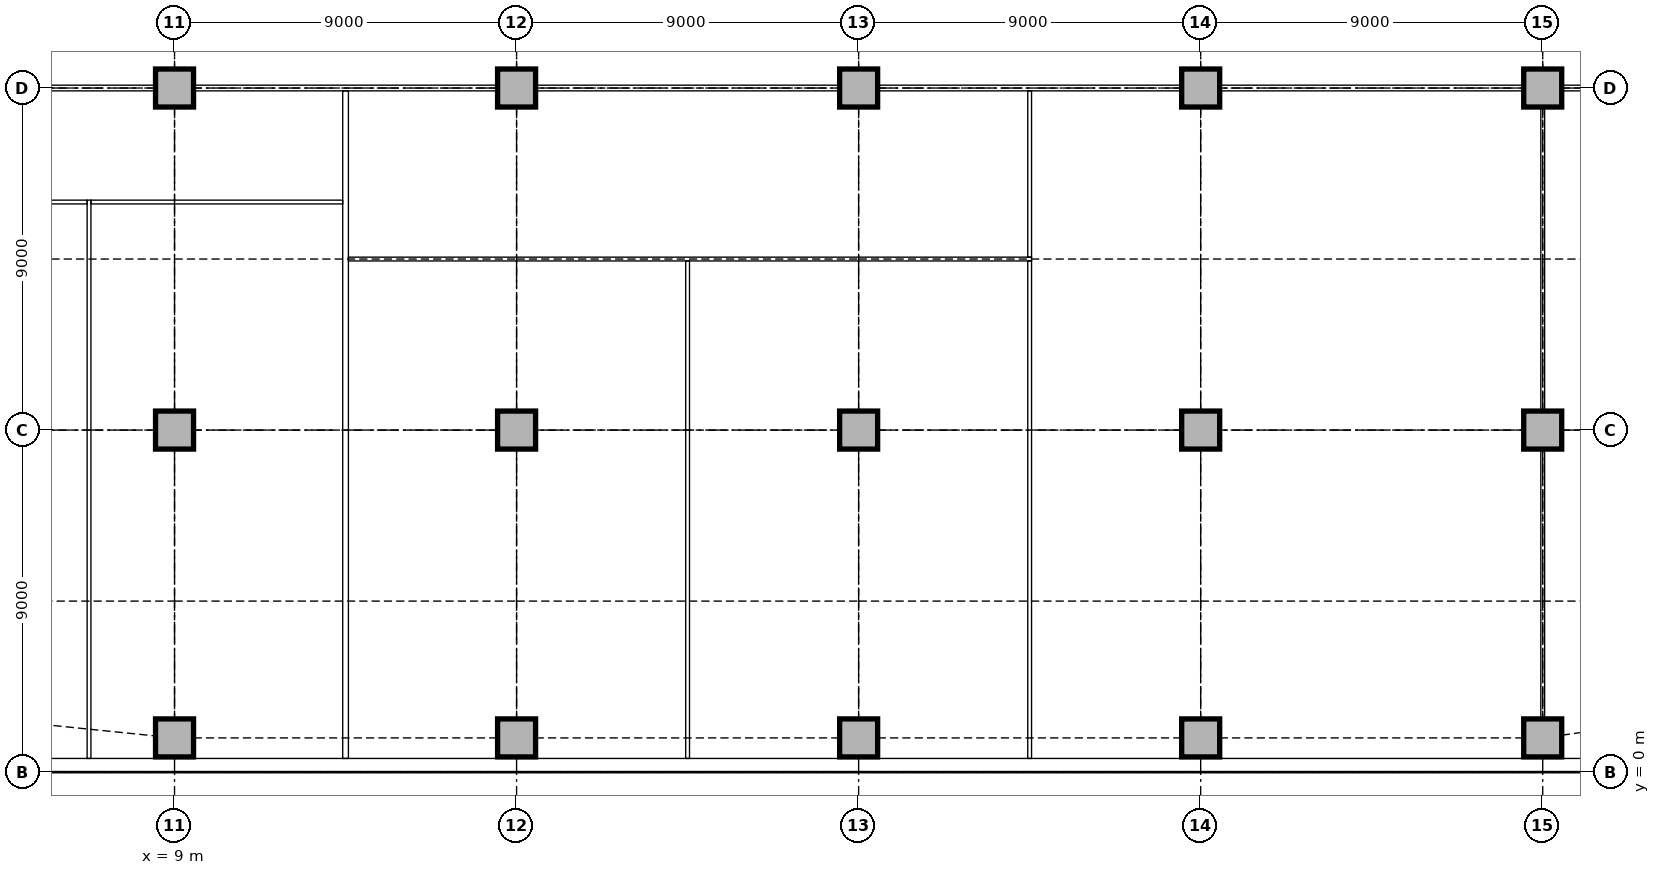
"""IFC4 building model, lengths in metres.
Left out: names, types, materials, properties, quantities, classifications, styles, units other than length and angle.
Written with IfcOpenShell. Run it as: python <this file> out.ifc"""

import sys

from ifc_helpers import new_model, si_unit, direction, frame, frame_2d, origin, origin_2d, place, context, subcontext, project, spatial, rectangle, extrude, element, fill, save


model = new_model("IFC4")
c1 = context("Model", 3, precision=1e-05, world=origin(), true_north=direction((0.0, 1.0)))
c2 = subcontext(c1, "Body", "Model", "MODEL_VIEW")
j1 = project(units=[si_unit("LENGTHUNIT", "METRE"), si_unit("PLANEANGLEUNIT", "RADIAN")], contexts=[c1])
p1 = place(None, origin())
s1 = spatial("IfcSite", under=j1, at=p1, CompositionType="ELEMENT")
p2 = place(p1, origin())
s2 = spatial("IfcBuilding", under=s1, at=p2, CompositionType="ELEMENT")
p3 = place(p2, frame((0.0, 0.0, 26.0)))
s3 = spatial("IfcBuildingStorey", under=s2, at=p3, CompositionType="ELEMENT", Elevation=26.0)
for number, where, z_axis, x_axis in (
    (1, (9.0, 0.9, 0.0), (0.0, 0.0, 1.0), (1.0, 0.0, 0.0)),
    (2, (18.0, 0.9, 0.0), (0.0, 0.0, 1.0), (1.0, 0.0, 0.0)),
    (3, (27.0, 0.9, 0.0), (0.0, 0.0, 1.0), (1.0, 0.0, 0.0)),
    (4, (36.0, 0.9, 0.0), (0.0, 0.0, 1.0), (1.0, 0.0, 0.0)),
    (5, (45.0, 0.9, 0.0), (0.0, 0.0, 1.0), (1.0, 0.0, 0.0)),
    (6, (9.0, 9.0, 0.0), (0.0, 0.0, 1.0), (1.0, 0.0, 0.0)),
    (7, (9.0, 18.0, 0.0), (0.0, 0.0, 1.0), (1.0, 0.0, 0.0)),
    (8, (18.0, 9.0, 0.0), (0.0, 0.0, 1.0), (1.0, 0.0, 0.0)),
    (9, (18.0, 18.0, 0.0), (0.0, 0.0, 1.0), (1.0, 0.0, 0.0)),
    (10, (27.0, 9.0, 0.0), (0.0, 0.0, 1.0), (1.0, 0.0, 0.0)),
    (11, (27.0, 18.0, 0.0), (0.0, 0.0, 1.0), (1.0, 0.0, 0.0)),
    (12, (36.0, 9.0, 0.0), (0.0, 0.0, 1.0), (1.0, 0.0, 0.0)),
    (13, (36.0, 18.0, 0.0), (0.0, 0.0, 1.0), (1.0, 0.0, 0.0)),
    (14, (45.0, 9.0, 0.0), (0.0, 0.0, 1.0), (1.0, 0.0, 0.0)),
    (15, (45.0, 18.0, 0.0), (0.0, 0.0, 1.0), (1.0, 0.0, 0.0)),
):
    element("IfcColumn", number, at=place(p3, frame(where, z_axis=z_axis, x_axis=x_axis)), inside=s3, PredefinedType="COLUMN", context=c2, shape_type="SweptSolid", body=[
        extrude(rectangle(XDim=1.0, YDim=1.0, at=origin_2d()), origin(), (0.0, 0.0, 1.0), 3.85),
    ])
p4 = place(p3, frame((4.243, 0.18, 0.0), z_axis=(0.0, 0.0, 1.0), x_axis=(1.0, 0.0, 0.0)))
e16 = element("IfcWall", 16, at=p4, inside=s3, PredefinedType="STANDARD", context=c2, shape_type="SweptSolid", body=[
    extrude(rectangle(XDim=44.015, YDim=0.36, at=frame_2d((22.007, 0.0))), origin(), (0.0, 0.0, 1.0), 3.85),
])
p5 = place(p4, frame((2.707, 0.0, 0.9)))
e17 = element("IfcOpeningElement", 17, at=p5, cuts=e16, PredefinedType="OPENING", context=c2, shape_type="SweptSolid", body=[
    extrude(rectangle(XDim=3.3, YDim=1.6, at=frame_2d((1.65, 0.8))), frame((0.0, 0.19, 0.0), z_axis=(0.0, -1.0, 0.0), x_axis=(1.0, 0.0, 0.0)), (0.0, 0.0, 1.0), 0.38),
])
p6 = place(p4, frame((7.157, 0.0, 0.0)))
e18 = element("IfcOpeningElement", 18, at=p6, cuts=e16, PredefinedType="OPENING", context=c2, shape_type="SweptSolid", body=[
    extrude(rectangle(XDim=1.8, YDim=2.4, at=frame_2d((0.9, 1.2))), frame((0.0, 0.19, 0.0), z_axis=(0.0, -1.0, 0.0), x_axis=(1.0, 0.0, 0.0)), (0.0, 0.0, 1.0), 0.38),
])
p7 = place(p4, frame((11.357, 0.0, 0.9)))
e19 = element("IfcOpeningElement", 19, at=p7, cuts=e16, PredefinedType="OPENING", context=c2, shape_type="SweptSolid", body=[
    extrude(rectangle(XDim=3.3, YDim=1.6, at=frame_2d((1.65, 0.8))), frame((0.0, 0.19, 0.0), z_axis=(0.0, -1.0, 0.0), x_axis=(1.0, 0.0, 0.0)), (0.0, 0.0, 1.0), 0.38),
])
p8 = place(p4, frame((16.307, 0.0, 0.9)))
e20 = element("IfcOpeningElement", 20, at=p8, cuts=e16, PredefinedType="OPENING", context=c2, shape_type="SweptSolid", body=[
    extrude(rectangle(XDim=1.8, YDim=1.6, at=frame_2d((0.9, 0.8))), frame((0.0, 0.19, 0.0), z_axis=(0.0, -1.0, 0.0), x_axis=(1.0, 0.0, 0.0)), (0.0, 0.0, 1.0), 0.38),
])
p9 = place(p4, frame((20.357, 0.0, 0.9)))
e21 = element("IfcOpeningElement", 21, at=p9, cuts=e16, PredefinedType="OPENING", context=c2, shape_type="SweptSolid", body=[
    extrude(rectangle(XDim=3.3, YDim=1.6, at=frame_2d((1.65, 0.8))), frame((0.0, 0.19, 0.0), z_axis=(0.0, -1.0, 0.0), x_axis=(1.0, 0.0, 0.0)), (0.0, 0.0, 1.0), 0.38),
])
p10 = place(p4, frame((25.307, 0.0, 0.9)))
e22 = element("IfcOpeningElement", 22, at=p10, cuts=e16, PredefinedType="OPENING", context=c2, shape_type="SweptSolid", body=[
    extrude(rectangle(XDim=1.8, YDim=1.6, at=frame_2d((0.9, 0.8))), frame((0.0, 0.19, 0.0), z_axis=(0.0, -1.0, 0.0), x_axis=(1.0, 0.0, 0.0)), (0.0, 0.0, 1.0), 0.38),
])
p11 = place(p4, frame((29.357, 0.0, 0.9)))
e23 = element("IfcOpeningElement", 23, at=p11, cuts=e16, PredefinedType="OPENING", context=c2, shape_type="SweptSolid", body=[
    extrude(rectangle(XDim=3.3, YDim=1.6, at=frame_2d((1.65, 0.8))), frame((0.0, 0.19, 0.0), z_axis=(0.0, -1.0, 0.0), x_axis=(1.0, 0.0, 0.0)), (0.0, 0.0, 1.0), 0.38),
])
p12 = place(p4, frame((33.857, 0.0, 0.9)))
e24 = element("IfcOpeningElement", 24, at=p12, cuts=e16, PredefinedType="OPENING", context=c2, shape_type="SweptSolid", body=[
    extrude(rectangle(XDim=3.3, YDim=1.6, at=frame_2d((1.65, 0.8))), frame((0.0, 0.19, 0.0), z_axis=(0.0, -1.0, 0.0), x_axis=(1.0, 0.0, 0.0)), (0.0, 0.0, 1.0), 0.38),
])
p13 = place(p4, frame((38.357, 0.0, 0.9)))
e25 = element("IfcOpeningElement", 25, at=p13, cuts=e16, PredefinedType="OPENING", context=c2, shape_type="SweptSolid", body=[
    extrude(rectangle(XDim=3.3, YDim=1.6, at=frame_2d((1.65, 0.8))), frame((0.0, 0.19, 0.0), z_axis=(0.0, -1.0, 0.0), x_axis=(1.0, 0.0, 0.0)), (0.0, 0.0, 1.0), 0.38),
])
p14 = place(p3, frame((45.5, 18.0, 0.0), z_axis=(0.0, 0.0, 1.0), x_axis=(1.0, 0.0, 0.0)))
e26 = element("IfcWall", 26, at=p14, inside=s3, PredefinedType="PARTITIONING", context=c2, shape_type="SweptSolid", body=[
    extrude(rectangle(XDim=8.0, YDim=0.15, at=frame_2d((4.0, 0.0))), origin(), (0.0, 0.0, 1.0), 3.15),
])
p15 = place(p3, frame((36.5, 18.0, 0.0), z_axis=(0.0, 0.0, 1.0), x_axis=(1.0, 0.0, 0.0)))
e27 = element("IfcWall", 27, at=p15, inside=s3, PredefinedType="PARTITIONING", context=c2, shape_type="SweptSolid", body=[
    extrude(rectangle(XDim=8.0, YDim=0.15, at=frame_2d((4.0, 0.0))), origin(), (0.0, 0.0, 1.0), 3.15),
])
p16 = place(p15, frame((3.55, 0.0, 0.0)))
e28 = element("IfcOpeningElement", 28, at=p16, cuts=e27, PredefinedType="OPENING", context=c2, shape_type="SweptSolid", body=[
    extrude(rectangle(XDim=0.9, YDim=2.1, at=frame_2d((0.45, 1.05))), frame((0.0, 0.085, 0.0), z_axis=(0.0, -1.0, 0.0), x_axis=(1.0, 0.0, 0.0)), (0.0, 0.0, 1.0), 0.17),
])
p17 = place(p3, frame((27.5, 18.0, 0.0), z_axis=(0.0, 0.0, 1.0), x_axis=(1.0, 0.0, 0.0)))
e29 = element("IfcWall", 29, at=p17, inside=s3, PredefinedType="PARTITIONING", context=c2, shape_type="SweptSolid", body=[
    extrude(rectangle(XDim=8.0, YDim=0.15, at=frame_2d((4.0, 0.0))), origin(), (0.0, 0.0, 1.0), 3.15),
])
p18 = place(p3, frame((18.5, 18.0, 0.0), z_axis=(0.0, 0.0, 1.0), x_axis=(1.0, 0.0, 0.0)))
e30 = element("IfcWall", 30, at=p18, inside=s3, PredefinedType="PARTITIONING", context=c2, shape_type="SweptSolid", body=[
    extrude(rectangle(XDim=8.0, YDim=0.15, at=frame_2d((4.0, 0.0))), origin(), (0.0, 0.0, 1.0), 3.15),
])
p19 = place(p18, frame((3.5, 0.0, 0.0)))
e31 = element("IfcOpeningElement", 31, at=p19, cuts=e30, PredefinedType="OPENING", context=c2, shape_type="SweptSolid", body=[
    extrude(rectangle(XDim=1.0, YDim=2.1, at=frame_2d((0.5, 1.05))), frame((0.0, 0.085, 0.0), z_axis=(0.0, -1.0, 0.0), x_axis=(1.0, 0.0, 0.0)), (0.0, 0.0, 1.0), 0.17),
])
p20 = place(p3, frame((9.5, 18.0, 0.0), z_axis=(0.0, 0.0, 1.0), x_axis=(1.0, 0.0, 0.0)))
e32 = element("IfcWall", 32, at=p20, inside=s3, PredefinedType="PARTITIONING", context=c2, shape_type="SweptSolid", body=[
    extrude(rectangle(XDim=8.0, YDim=0.15, at=frame_2d((4.0, 0.0))), origin(), (0.0, 0.0, 1.0), 3.15),
])
p21 = place(p3, frame((1.4, 18.0, 0.0), z_axis=(0.0, 0.0, 1.0), x_axis=(1.0, 0.0, 0.0)))
e33 = element("IfcWall", 33, at=p21, inside=s3, PredefinedType="PARTITIONING", context=c2, shape_type="SweptSolid", body=[
    extrude(rectangle(XDim=7.1, YDim=0.15, at=frame_2d((3.55, 0.0))), origin(), (0.0, 0.0, 1.0), 3.15),
])
p22 = place(p21, frame((3.05, 0.0, 0.0)))
e34 = element("IfcOpeningElement", 34, at=p22, cuts=e33, PredefinedType="OPENING", context=c2, shape_type="SweptSolid", body=[
    extrude(rectangle(XDim=1.0, YDim=2.1, at=frame_2d((0.5, 1.05))), frame((0.0, 0.085, 0.0), z_axis=(0.0, -1.0, 0.0), x_axis=(1.0, 0.0, 0.0)), (0.0, 0.0, 1.0), 0.17),
])
p23 = place(p3, frame((13.5, 0.36, 0.0), z_axis=(0.0, 0.0, 1.0), x_axis=(0.0, 1.0, 0.0)))
e35 = element("IfcWall", 35, at=p23, inside=s3, PredefinedType="PARTITIONING", context=c2, shape_type="SweptSolid", body=[
    extrude(rectangle(XDim=17.565, YDim=0.15, at=frame_2d((8.783, 0.0))), origin(), (0.0, 0.0, 1.0), 3.85),
])
p24 = place(p3, frame((13.575, 13.5, 0.0), z_axis=(0.0, 0.0, 1.0), x_axis=(1.0, 0.0, 0.0)))
e36 = element("IfcWall", 36, at=p24, inside=s3, PredefinedType="PARTITIONING", context=c2, shape_type="SweptSolid", body=[
    extrude(rectangle(XDim=17.975, YDim=0.1, at=frame_2d((8.988, 0.0))), origin(), (0.0, 0.0, 1.0), 3.35),
])
p25 = place(p24, frame((4.1, 0.0, 0.0)))
e37 = element("IfcOpeningElement", 37, at=p25, cuts=e36, PredefinedType="OPENING", context=c2, shape_type="SweptSolid", body=[
    extrude(rectangle(XDim=0.9, YDim=2.1, at=frame_2d((0.45, 1.05))), frame((0.0, 0.06, 0.0), z_axis=(0.0, -1.0, 0.0), x_axis=(1.0, 0.0, 0.0)), (0.0, 0.0, 1.0), 0.12),
])
p26 = place(p24, frame((12.925, 0.0, 0.0)))
e38 = element("IfcOpeningElement", 38, at=p26, cuts=e36, PredefinedType="OPENING", context=c2, shape_type="SweptSolid", body=[
    extrude(rectangle(XDim=0.9, YDim=2.1, at=frame_2d((0.45, 1.05))), frame((0.0, 0.06, 0.0), z_axis=(0.0, -1.0, 0.0), x_axis=(1.0, 0.0, 0.0)), (0.0, 0.0, 1.0), 0.12),
])
p27 = place(p3, frame((31.5, 13.55, 0.0), z_axis=(0.0, 0.0, 1.0), x_axis=(0.0, 1.0, 0.0)))
e39 = element("IfcWall", 39, at=p27, inside=s3, PredefinedType="PARTITIONING", context=c2, shape_type="SweptSolid", body=[
    extrude(rectangle(XDim=4.375, YDim=0.1, at=frame_2d((2.188, 0.0))), origin(), (0.0, 0.0, 1.0), 3.85),
])
p28 = place(p3, frame((31.5, 0.36, 0.0), z_axis=(0.0, 0.0, 1.0), x_axis=(0.0, 1.0, 0.0)))
e40 = element("IfcWall", 40, at=p28, inside=s3, PredefinedType="PARTITIONING", context=c2, shape_type="SweptSolid", body=[
    extrude(rectangle(XDim=13.09, YDim=0.1, at=frame_2d((6.545, 0.0))), origin(), (0.0, 0.0, 1.0), 3.85),
])
p29 = place(p3, frame((45.0, 1.4, 0.0), z_axis=(0.0, 0.0, 1.0), x_axis=(0.0, 1.0, 0.0)))
e41 = element("IfcWall", 41, at=p29, inside=s3, PredefinedType="PARTITIONING", context=c2, shape_type="SweptSolid", body=[
    extrude(rectangle(XDim=7.1, YDim=0.1, at=frame_2d((3.55, 0.0))), origin(), (0.0, 0.0, 1.0), 3.158),
])
p30 = place(p3, frame((45.0, 9.5, 0.0), z_axis=(0.0, 0.0, 1.0), x_axis=(0.0, 1.0, 0.0)))
e42 = element("IfcWall", 42, at=p30, inside=s3, PredefinedType="PARTITIONING", context=c2, shape_type="SweptSolid", body=[
    extrude(rectangle(XDim=8.0, YDim=0.1, at=frame_2d((4.0, 0.0))), origin(), (0.0, 0.0, 1.0), 3.158),
])
p31 = place(p3, frame((6.75, 0.36, 0.0), z_axis=(0.0, 0.0, 1.0), x_axis=(0.0, 1.0, 0.0)))
e43 = element("IfcWall", 43, at=p31, inside=s3, PredefinedType="PARTITIONING", context=c2, shape_type="SweptSolid", body=[
    extrude(rectangle(XDim=14.69, YDim=0.1, at=frame_2d((7.345, 0.0))), origin(), (0.0, 0.0, 1.0), 3.85),
])
p32 = place(p3, frame((6.8, 15.0, 0.0), z_axis=(0.0, 0.0, 1.0), x_axis=(1.0, 0.0, 0.0)))
e44 = element("IfcWall", 44, at=p32, inside=s3, PredefinedType="PARTITIONING", context=c2, shape_type="SweptSolid", body=[
    extrude(rectangle(XDim=6.625, YDim=0.1, at=frame_2d((3.312, 0.0))), origin(), (0.0, 0.0, 1.0), 3.85),
])
p33 = place(p32, frame((2.85, 0.0, 0.0)))
e45 = element("IfcOpeningElement", 45, at=p33, cuts=e44, PredefinedType="OPENING", context=c2, shape_type="SweptSolid", body=[
    extrude(rectangle(XDim=0.9, YDim=2.1, at=frame_2d((0.45, 1.05))), frame((0.0, 0.06, 0.0), z_axis=(0.0, -1.0, 0.0), x_axis=(1.0, 0.0, 0.0)), (0.0, 0.0, 1.0), 0.12),
])
p34 = place(p3, frame((0.36, 15.0, 0.0), z_axis=(0.0, 0.0, 1.0), x_axis=(1.0, 0.0, 0.0)))
e46 = element("IfcWall", 46, at=p34, inside=s3, PredefinedType="PARTITIONING", context=c2, shape_type="SweptSolid", body=[
    extrude(rectangle(XDim=6.34, YDim=0.1, at=frame_2d((3.17, 0.0))), origin(), (0.0, 0.0, 1.0), 3.85),
])
p35 = place(p34, frame((2.7, 0.0, 0.0)))
e47 = element("IfcOpeningElement", 47, at=p35, cuts=e46, PredefinedType="OPENING", context=c2, shape_type="SweptSolid", body=[
    extrude(rectangle(XDim=0.9, YDim=2.1, at=frame_2d((0.45, 1.05))), frame((0.0, 0.06, 0.0), z_axis=(0.0, -1.0, 0.0), x_axis=(1.0, 0.0, 0.0)), (0.0, 0.0, 1.0), 0.12),
])
p36 = place(p3, frame((22.5, 0.36, 0.0), z_axis=(0.0, 0.0, 1.0), x_axis=(0.0, 1.0, 0.0)))
e48 = element("IfcWall", 48, at=p36, inside=s3, PredefinedType="PARTITIONING", context=c2, shape_type="SweptSolid", body=[
    extrude(rectangle(XDim=13.09, YDim=0.1, at=frame_2d((6.545, 0.0))), origin(), (0.0, 0.0, 1.0), 3.85),
])
p37 = place(p5, origin())
e49 = element("IfcWindow", 49, at=p37, inside=s3, PartitioningType="SINGLE_PANEL", PredefinedType="WINDOW", context=c2, shape_type="SweptSolid", body=[
    extrude(rectangle(XDim=3.3, YDim=1.6, at=frame_2d((1.65, 0.8))), frame((0.0, 0.13, 0.0), z_axis=(0.0, -1.0, 0.0), x_axis=(1.0, 0.0, 0.0)), (0.0, 0.0, 1.0), 0.06),
])
fill(e17, e49)
p38 = place(p6, frame((1.8, 0.0, 0.0), z_axis=(0.0, 0.0, 1.0), x_axis=(-1.0, 0.0, 0.0)))
e50 = element("IfcDoor", 50, at=p38, inside=s3, OperationType="DOUBLE_DOOR_SINGLE_SWING", PredefinedType="DOOR", context=c2, shape_type="SweptSolid", body=[
    extrude(rectangle(XDim=1.8, YDim=2.4, at=frame_2d((0.9, 1.2))), frame((0.0, -0.07, 0.0), z_axis=(0.0, -1.0, 0.0), x_axis=(1.0, 0.0, 0.0)), (0.0, 0.0, 1.0), 0.05),
])
fill(e18, e50)
p39 = place(p7, origin())
e51 = element("IfcWindow", 51, at=p39, inside=s3, PartitioningType="SINGLE_PANEL", PredefinedType="WINDOW", context=c2, shape_type="SweptSolid", body=[
    extrude(rectangle(XDim=3.3, YDim=1.6, at=frame_2d((1.65, 0.8))), frame((0.0, 0.13, 0.0), z_axis=(0.0, -1.0, 0.0), x_axis=(1.0, 0.0, 0.0)), (0.0, 0.0, 1.0), 0.06),
])
fill(e19, e51)
p40 = place(p8, origin())
e52 = element("IfcWindow", 52, at=p40, inside=s3, PartitioningType="SINGLE_PANEL", PredefinedType="WINDOW", context=c2, shape_type="SweptSolid", body=[
    extrude(rectangle(XDim=1.8, YDim=1.6, at=frame_2d((0.9, 0.8))), frame((0.0, 0.13, 0.0), z_axis=(0.0, -1.0, 0.0), x_axis=(1.0, 0.0, 0.0)), (0.0, 0.0, 1.0), 0.06),
])
fill(e20, e52)
p41 = place(p9, origin())
e53 = element("IfcWindow", 53, at=p41, inside=s3, PartitioningType="SINGLE_PANEL", PredefinedType="WINDOW", context=c2, shape_type="SweptSolid", body=[
    extrude(rectangle(XDim=3.3, YDim=1.6, at=frame_2d((1.65, 0.8))), frame((0.0, 0.13, 0.0), z_axis=(0.0, -1.0, 0.0), x_axis=(1.0, 0.0, 0.0)), (0.0, 0.0, 1.0), 0.06),
])
fill(e21, e53)
p42 = place(p10, origin())
e54 = element("IfcWindow", 54, at=p42, inside=s3, PartitioningType="SINGLE_PANEL", PredefinedType="WINDOW", context=c2, shape_type="SweptSolid", body=[
    extrude(rectangle(XDim=1.8, YDim=1.6, at=frame_2d((0.9, 0.8))), frame((0.0, 0.13, 0.0), z_axis=(0.0, -1.0, 0.0), x_axis=(1.0, 0.0, 0.0)), (0.0, 0.0, 1.0), 0.06),
])
fill(e22, e54)
p43 = place(p11, origin())
e55 = element("IfcWindow", 55, at=p43, inside=s3, PartitioningType="SINGLE_PANEL", PredefinedType="WINDOW", context=c2, shape_type="SweptSolid", body=[
    extrude(rectangle(XDim=3.3, YDim=1.6, at=frame_2d((1.65, 0.8))), frame((0.0, 0.13, 0.0), z_axis=(0.0, -1.0, 0.0), x_axis=(1.0, 0.0, 0.0)), (0.0, 0.0, 1.0), 0.06),
])
fill(e23, e55)
p44 = place(p12, origin())
e56 = element("IfcWindow", 56, at=p44, inside=s3, PartitioningType="SINGLE_PANEL", PredefinedType="WINDOW", context=c2, shape_type="SweptSolid", body=[
    extrude(rectangle(XDim=3.3, YDim=1.6, at=frame_2d((1.65, 0.8))), frame((0.0, 0.13, 0.0), z_axis=(0.0, -1.0, 0.0), x_axis=(1.0, 0.0, 0.0)), (0.0, 0.0, 1.0), 0.06),
])
fill(e24, e56)
p45 = place(p13, origin())
e57 = element("IfcWindow", 57, at=p45, inside=s3, PartitioningType="SINGLE_PANEL", PredefinedType="WINDOW", context=c2, shape_type="SweptSolid", body=[
    extrude(rectangle(XDim=3.3, YDim=1.6, at=frame_2d((1.65, 0.8))), frame((0.0, 0.13, 0.0), z_axis=(0.0, -1.0, 0.0), x_axis=(1.0, 0.0, 0.0)), (0.0, 0.0, 1.0), 0.06),
])
fill(e25, e57)
p46 = place(p33, origin())
e58 = element("IfcDoor", 58, at=p46, inside=s3, OperationType="SINGLE_SWING_RIGHT", PredefinedType="DOOR", context=c2, shape_type="SweptSolid", body=[
    extrude(rectangle(XDim=0.9, YDim=2.1, at=frame_2d((0.45, 1.05))), frame((0.0, 0.025, 0.0), z_axis=(0.0, -1.0, 0.0), x_axis=(1.0, 0.0, 0.0)), (0.0, 0.0, 1.0), 0.05),
])
fill(e45, e58)
p47 = place(p19, frame((1.0, 0.0, 0.0), z_axis=(0.0, 0.0, 1.0), x_axis=(-1.0, 0.0, 0.0)))
e59 = element("IfcDoor", 59, at=p47, inside=s3, OperationType="SINGLE_SWING_RIGHT", PredefinedType="DOOR", context=c2, shape_type="SweptSolid", body=[
    extrude(rectangle(XDim=1.0, YDim=2.1, at=frame_2d((0.5, 1.05))), frame((0.0, 0.025, 0.0), z_axis=(0.0, -1.0, 0.0), x_axis=(1.0, 0.0, 0.0)), (0.0, 0.0, 1.0), 0.05),
])
fill(e31, e59)
p48 = place(p25, origin())
e60 = element("IfcDoor", 60, at=p48, inside=s3, OperationType="SINGLE_SWING_LEFT", PredefinedType="DOOR", context=c2, shape_type="SweptSolid", body=[
    extrude(rectangle(XDim=0.9, YDim=2.1, at=frame_2d((0.45, 1.05))), frame((0.0, 0.025, 0.0), z_axis=(0.0, -1.0, 0.0), x_axis=(1.0, 0.0, 0.0)), (0.0, 0.0, 1.0), 0.05),
])
fill(e37, e60)
p49 = place(p26, origin())
e61 = element("IfcDoor", 61, at=p49, inside=s3, OperationType="SINGLE_SWING_LEFT", PredefinedType="DOOR", context=c2, shape_type="SweptSolid", body=[
    extrude(rectangle(XDim=0.9, YDim=2.1, at=frame_2d((0.45, 1.05))), frame((0.0, 0.025, 0.0), z_axis=(0.0, -1.0, 0.0), x_axis=(1.0, 0.0, 0.0)), (0.0, 0.0, 1.0), 0.05),
])
fill(e38, e61)
p50 = place(p16, frame((0.9, 0.0, 0.0), z_axis=(0.0, 0.0, 1.0), x_axis=(-1.0, 0.0, 0.0)))
e62 = element("IfcDoor", 62, at=p50, inside=s3, OperationType="SINGLE_SWING_LEFT", PredefinedType="DOOR", context=c2, shape_type="SweptSolid", body=[
    extrude(rectangle(XDim=0.9, YDim=2.1, at=frame_2d((0.45, 1.05))), frame((0.0, 0.025, 0.0), z_axis=(0.0, -1.0, 0.0), x_axis=(1.0, 0.0, 0.0)), (0.0, 0.0, 1.0), 0.05),
])
fill(e28, e62)
save(model, sys.argv[1])
